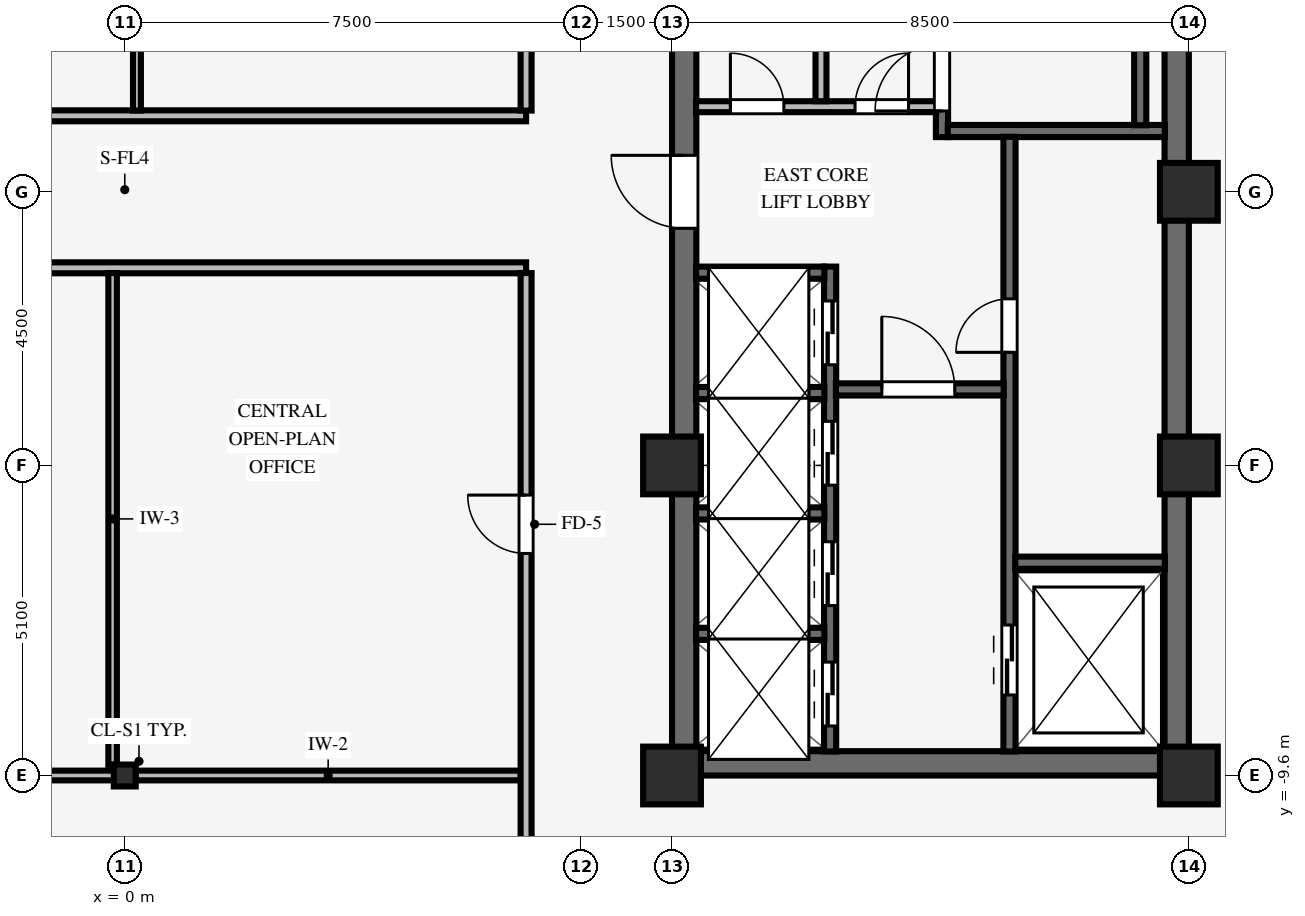
"""IFC4 building model, lengths in metres.
Left out: names, types, materials, properties, quantities, classifications, styles, units other than length and angle.
Written with IfcOpenShell. Run it as: python <this file> out.ifc"""

import sys

from ifc_helpers import new_model, si_unit, direction, frame, frame_2d, origin, origin_2d, place, context, subcontext, project, spatial, rectangle, i_section, extrude, source, transform, mapped, element, fill, save


model = new_model("IFC4")
c1 = context("Model", 3, precision=1e-05, world=origin(), true_north=direction((0.0, 1.0)))
c2 = subcontext(c1, "Body", "Model", "MODEL_VIEW")
j1 = project(units=[si_unit("LENGTHUNIT", "METRE"), si_unit("PLANEANGLEUNIT", "RADIAN")], contexts=[c1])
p1 = place(None, origin())
s1 = spatial("IfcSite", under=j1, at=p1, CompositionType="ELEMENT")
p2 = place(p1, origin())
s2 = spatial("IfcBuilding", under=s1, at=p2, CompositionType="ELEMENT")
p3 = place(p2, frame((0.0, 0.0, 142.1)))
s3 = spatial("IfcBuildingStorey", under=s2, at=p3, CompositionType="ELEMENT", Elevation=142.1)
p4 = place(p3, frame((9.0, -9.4, 0.0), z_axis=(0.0, 0.0, 1.0), x_axis=(1.0, 0.0, 0.0)))
e1 = element("IfcWall", 1, at=p4, inside=s3, PredefinedType="SHEAR", context=c2, shape_type="SweptSolid", body=[
    extrude(rectangle(XDim=8.5, YDim=0.4, at=frame_2d((4.25, 0.0))), origin(), (0.0, 0.0, 1.0), 3.37),
])
p5 = place(p3, frame((9.2, -9.205, 0.0), z_axis=(0.0, 0.0, 1.0), x_axis=(0.0, 1.0, 0.0)))
e2 = element("IfcWall", 2, at=p5, inside=s3, PredefinedType="SHEAR", context=c2, shape_type="SweptSolid", body=[
    extrude(rectangle(XDim=18.41, YDim=0.4, at=frame_2d((9.205, 0.0))), origin(), (0.0, 0.0, 1.0), 3.37),
])
p6 = place(p5, frame((8.605, 0.0, 0.0)))
e3 = element("IfcOpeningElement", 3, at=p6, cuts=e2, PredefinedType="OPENING", context=c2, shape_type="SweptSolid", body=[
    extrude(rectangle(XDim=1.2, YDim=2.15, at=frame_2d((0.6, 1.075))), frame((0.0, 0.21, 0.0), z_axis=(0.0, -1.0, 0.0), x_axis=(1.0, 0.0, 0.0)), (0.0, 0.0, 1.0), 0.42),
])
p7 = place(p3, frame((17.3, -9.205, 0.0), z_axis=(0.0, 0.0, 1.0), x_axis=(0.0, 1.0, 0.0)))
e4 = element("IfcWall", 4, at=p7, inside=s3, PredefinedType="SHEAR", context=c2, shape_type="SweptSolid", body=[
    extrude(rectangle(XDim=18.41, YDim=0.4, at=frame_2d((9.205, 0.0))), origin(), (0.0, 0.0, 1.0), 3.37),
])
for number, where, z_axis, x_axis in (
    (5, (9.0, -9.6, 0.0), (0.0, 0.0, 1.0), (1.0, 0.0, 0.0)),
    (6, (9.0, -4.5, 0.0), (0.0, 0.0, 1.0), (1.0, 0.0, 0.0)),
    (7, (17.5, -9.6, 0.0), (0.0, 0.0, 1.0), (1.0, 0.0, 0.0)),
    (8, (17.5, -4.5, 0.0), (0.0, 0.0, 1.0), (1.0, 0.0, 0.0)),
    (9, (17.5, 0.0, 0.0), (0.0, 0.0, 1.0), (1.0, 0.0, 0.0)),
):
    element("IfcColumn", number, at=place(p3, frame(where, z_axis=z_axis, x_axis=x_axis)), inside=s3, PredefinedType="COLUMN", context=c2, shape_type="SweptSolid", body=[
        extrude(rectangle(XDim=0.95, YDim=0.95, at=origin_2d()), origin(), (0.0, 0.0, 1.0), 3.37),
    ])
p8 = place(p3, frame((0.0, -9.6, 0.0), z_axis=(0.0, 0.0, 1.0), x_axis=(1.0, 0.0, 0.0)))
e10 = element("IfcColumn", 10, at=p8, inside=s3, PredefinedType="COLUMN", context=c2, shape_type="SweptSolid", body=[
    extrude(i_section(OverallWidth=0.36, OverallDepth=0.36, WebThickness=0.021, FlangeThickness=0.021, FilletRadius=0.018, at=origin_2d()), origin(), (0.0, 0.0, 1.0), 3.37),
])
p9 = place(p3, frame((13.44, 0.9, 0.0), z_axis=(0.0, 0.0, 1.0), x_axis=(0.0, 1.0, 0.0)))
e11 = element("IfcWall", 11, at=p9, inside=s3, PredefinedType="SHEAR", context=c2, shape_type="SweptSolid", body=[
    extrude(rectangle(XDim=8.305, YDim=0.2, at=frame_2d((4.153, 0.0))), origin(), (0.0, 0.0, 1.0), 3.37),
])
p10 = place(p9, frame((0.43, 0.0, 0.0)))
e12 = element("IfcOpeningElement", 12, at=p10, cuts=e11, PredefinedType="OPENING", context=c2, shape_type="SweptSolid", body=[
    extrude(rectangle(XDim=1.1, YDim=2.15, at=frame_2d((0.55, 1.075))), frame((0.0, 0.11, 0.0), z_axis=(0.0, -1.0, 0.0), x_axis=(1.0, 0.0, 0.0)), (0.0, 0.0, 1.0), 0.22),
])
p11 = place(p3, frame((13.535, 1.0, 0.0), z_axis=(0.0, 0.0, 1.0), x_axis=(1.0, 0.0, 0.0)))
e13 = element("IfcWall", 13, at=p11, inside=s3, PredefinedType="SHEAR", context=c2, shape_type="SweptSolid", body=[
    extrude(rectangle(XDim=3.57, YDim=0.2, at=frame_2d((1.785, 0.0))), origin(), (0.0, 0.0, 1.0), 3.37),
])
p12 = place(p3, frame((16.7, 1.095, 0.0), z_axis=(0.0, 0.0, 1.0), x_axis=(0.0, 1.0, 0.0)))
e14 = element("IfcWall", 14, at=p12, inside=s3, PredefinedType="SHEAR", context=c2, shape_type="SweptSolid", body=[
    extrude(rectangle(XDim=8.11, YDim=0.2, at=frame_2d((4.055, 0.0))), origin(), (0.0, 0.0, 1.0), 3.37),
])
p13 = place(p3, frame((14.55, -9.205, 0.0), z_axis=(0.0, 0.0, 1.0), x_axis=(0.0, 1.0, 0.0)))
e15 = element("IfcWall", 15, at=p13, inside=s3, PredefinedType="SHEAR", context=c2, shape_type="SweptSolid", body=[
    extrude(rectangle(XDim=10.11, YDim=0.2, at=frame_2d((5.055, 0.0))), origin(), (0.0, 0.0, 1.0), 3.37),
])
p14 = place(p13, frame((6.565, 0.0, 0.0)))
e16 = element("IfcOpeningElement", 16, at=p14, cuts=e15, PredefinedType="OPENING", context=c2, shape_type="SweptSolid", body=[
    extrude(rectangle(XDim=0.88, YDim=2.1, at=frame_2d((0.44, 1.05))), frame((0.0, 0.11, 0.0), z_axis=(0.0, -1.0, 0.0), x_axis=(1.0, 0.0, 0.0)), (0.0, 0.0, 1.0), 0.22),
])
p15 = place(p13, frame((0.93, 0.0, 0.0)))
e17 = element("IfcOpeningElement", 17, at=p15, cuts=e15, PredefinedType="OPENING", context=c2, shape_type="SweptSolid", body=[
    extrude(rectangle(XDim=1.15, YDim=2.15, at=frame_2d((0.575, 1.075))), frame((0.0, 0.11, 0.0), z_axis=(0.0, -1.0, 0.0), x_axis=(1.0, 0.0, 0.0)), (0.0, 0.0, 1.0), 0.22),
])
p16 = place(p3, frame((14.645, -6.1, 0.0), z_axis=(0.0, 0.0, 1.0), x_axis=(1.0, 0.0, 0.0)))
e18 = element("IfcWall", 18, at=p16, inside=s3, PredefinedType="SHEAR", context=c2, shape_type="SweptSolid", body=[
    extrude(rectangle(XDim=2.46, YDim=0.2, at=frame_2d((1.23, 0.0))), origin(), (0.0, 0.0, 1.0), 3.37),
])
p17 = place(p3, frame((11.6, -9.205, 0.0), z_axis=(0.0, 0.0, 1.0), x_axis=(0.0, 1.0, 0.0)))
e19 = element("IfcWall", 19, at=p17, inside=s3, PredefinedType="SHEAR", context=c2, shape_type="SweptSolid", body=[
    extrude(rectangle(XDim=7.975, YDim=0.2, at=frame_2d((3.988, 0.0))), origin(), (0.0, 0.0, 1.0), 3.37),
])
p18 = place(p17, frame((0.42, 0.0, 0.0)))
e20 = element("IfcOpeningElement", 20, at=p18, cuts=e19, PredefinedType="OPENING", context=c2, shape_type="SweptSolid", body=[
    extrude(rectangle(XDim=1.05, YDim=2.15, at=frame_2d((0.525, 1.075))), frame((0.0, 0.11, 0.0), z_axis=(0.0, -1.0, 0.0), x_axis=(1.0, 0.0, 0.0)), (0.0, 0.0, 1.0), 0.22),
])
p19 = place(p17, frame((2.4, 0.0, 0.0)))
e21 = element("IfcOpeningElement", 21, at=p19, cuts=e19, PredefinedType="OPENING", context=c2, shape_type="SweptSolid", body=[
    extrude(rectangle(XDim=1.05, YDim=2.15, at=frame_2d((0.525, 1.075))), frame((0.0, 0.11, 0.0), z_axis=(0.0, -1.0, 0.0), x_axis=(1.0, 0.0, 0.0)), (0.0, 0.0, 1.0), 0.22),
])
p20 = place(p17, frame((4.38, 0.0, 0.0)))
e22 = element("IfcOpeningElement", 22, at=p20, cuts=e19, PredefinedType="OPENING", context=c2, shape_type="SweptSolid", body=[
    extrude(rectangle(XDim=1.05, YDim=2.15, at=frame_2d((0.525, 1.075))), frame((0.0, 0.11, 0.0), z_axis=(0.0, -1.0, 0.0), x_axis=(1.0, 0.0, 0.0)), (0.0, 0.0, 1.0), 0.22),
])
p21 = place(p17, frame((6.36, 0.0, 0.0)))
e23 = element("IfcOpeningElement", 23, at=p21, cuts=e19, PredefinedType="OPENING", context=c2, shape_type="SweptSolid", body=[
    extrude(rectangle(XDim=1.05, YDim=2.15, at=frame_2d((0.525, 1.075))), frame((0.0, 0.11, 0.0), z_axis=(0.0, -1.0, 0.0), x_axis=(1.0, 0.0, 0.0)), (0.0, 0.0, 1.0), 0.22),
])
p22 = place(p3, frame((11.695, -3.25, 0.0), z_axis=(0.0, 0.0, 1.0), x_axis=(1.0, 0.0, 0.0)))
e24 = element("IfcWall", 24, at=p22, inside=s3, PredefinedType="SHEAR", context=c2, shape_type="SweptSolid", body=[
    extrude(rectangle(XDim=2.76, YDim=0.2, at=frame_2d((1.38, 0.0))), origin(), (0.0, 0.0, 1.0), 3.37),
])
p23 = place(p22, frame((0.755, 0.0, 0.0)))
e25 = element("IfcOpeningElement", 25, at=p23, cuts=e24, PredefinedType="OPENING", context=c2, shape_type="SweptSolid", body=[
    extrude(rectangle(XDim=1.2, YDim=2.15, at=frame_2d((0.6, 1.075))), frame((0.0, 0.11, 0.0), z_axis=(0.0, -1.0, 0.0), x_axis=(1.0, 0.0, 0.0)), (0.0, 0.0, 1.0), 0.22),
])
for number, where, z_axis, x_axis in (
    (26, (9.395, -7.27, 0.0), (0.0, 0.0, 1.0), (1.0, 0.0, 0.0)),
    (27, (9.395, -5.29, 0.0), (0.0, 0.0, 1.0), (1.0, 0.0, 0.0)),
    (28, (9.395, -3.31, 0.0), (0.0, 0.0, 1.0), (1.0, 0.0, 0.0)),
    (29, (9.395, -1.33, 0.0), (0.0, 0.0, 1.0), (1.0, 0.0, 0.0)),
):
    element("IfcWall", number, at=place(p3, frame(where, z_axis=z_axis, x_axis=x_axis)), inside=s3, PredefinedType="SHEAR", context=c2, shape_type="SweptSolid", body=[
        extrude(rectangle(XDim=2.11, YDim=0.2, at=frame_2d((1.055, 0.0))), origin(), (0.0, 0.0, 1.0), 3.37),
    ])
p24 = place(p3, frame((9.395, 1.4, 0.0), z_axis=(0.0, 0.0, 1.0), x_axis=(1.0, 0.0, 0.0)))
e30 = element("IfcWall", 30, at=p24, inside=s3, PredefinedType="PARTITIONING", context=c2, shape_type="SweptSolid", body=[
    extrude(rectangle(XDim=3.95, YDim=0.18, at=frame_2d((1.975, 0.0))), origin(), (0.0, 0.0, 1.0), 3.36),
])
p25 = place(p24, frame((0.565, 0.0, 0.0)))
e31 = element("IfcOpeningElement", 31, at=p25, cuts=e30, PredefinedType="OPENING", context=c2, shape_type="SweptSolid", body=[
    extrude(rectangle(XDim=0.88, YDim=2.1, at=frame_2d((0.44, 1.05))), frame((0.0, 0.1, 0.0), z_axis=(0.0, -1.0, 0.0), x_axis=(1.0, 0.0, 0.0)), (0.0, 0.0, 1.0), 0.2),
])
p26 = place(p24, frame((2.615, 0.0, 0.0)))
e32 = element("IfcOpeningElement", 32, at=p26, cuts=e30, PredefinedType="OPENING", context=c2, shape_type="SweptSolid", body=[
    extrude(rectangle(XDim=0.88, YDim=2.1, at=frame_2d((0.44, 1.05))), frame((0.0, 0.1, 0.0), z_axis=(0.0, -1.0, 0.0), x_axis=(1.0, 0.0, 0.0)), (0.0, 0.0, 1.0), 0.2),
])
p27 = place(p3, frame((11.45, 1.49, 0.0), z_axis=(0.0, 0.0, 1.0), x_axis=(0.0, 1.0, 0.0)))
e33 = element("IfcWall", 33, at=p27, inside=s3, PredefinedType="PARTITIONING", context=c2, shape_type="SweptSolid", body=[
    extrude(rectangle(XDim=7.715, YDim=0.18, at=frame_2d((3.857, 0.0))), origin(), (0.0, 0.0, 1.0), 3.36),
])
p28 = place(p3, frame((-8.529, -9.6, 0.0), z_axis=(0.0, 0.0, 1.0), x_axis=(1.0, 0.0, 0.0)))
e34 = element("IfcWall", 34, at=p28, inside=s3, PredefinedType="PARTITIONING", context=c2, shape_type="SweptSolid", body=[
    extrude(rectangle(XDim=8.353, YDim=0.16, at=frame_2d((4.177, 0.0))), origin(), (0.0, 0.0, 1.0), 2.405),
])
p29 = place(p3, frame((0.176, -9.6, 0.0), z_axis=(0.0, 0.0, 1.0), x_axis=(1.0, 0.0, 0.0)))
e35 = element("IfcWall", 35, at=p29, inside=s3, PredefinedType="PARTITIONING", context=c2, shape_type="SweptSolid", body=[
    extrude(rectangle(XDim=6.338, YDim=0.16, at=frame_2d((3.169, 0.0))), origin(), (0.0, 0.0, 1.0), 2.405),
])
p30 = place(p3, frame((-9.0, -1.25, 0.0), z_axis=(0.0, 0.0, 1.0), x_axis=(1.0, 0.0, 0.0)))
e36 = element("IfcWall", 36, at=p30, inside=s3, PredefinedType="PARTITIONING", context=c2, shape_type="SweptSolid", body=[
    extrude(rectangle(XDim=15.6, YDim=0.18, at=frame_2d((7.8, 0.0))), origin(), (0.0, 0.0, 1.0), 3.36),
])
p31 = place(p30, frame((3.92, 0.0, 0.0)))
e37 = element("IfcOpeningElement", 37, at=p31, cuts=e36, PredefinedType="OPENING", context=c2, shape_type="SweptSolid", body=[
    extrude(rectangle(XDim=0.96, YDim=2.1, at=frame_2d((0.48, 1.05))), frame((0.0, 0.1, 0.0), z_axis=(0.0, -1.0, 0.0), x_axis=(1.0, 0.0, 0.0)), (0.0, 0.0, 1.0), 0.2),
])
p32 = place(p3, frame((-9.0, 1.25, 0.0), z_axis=(0.0, 0.0, 1.0), x_axis=(1.0, 0.0, 0.0)))
e38 = element("IfcWall", 38, at=p32, inside=s3, PredefinedType="PARTITIONING", context=c2, shape_type="SweptSolid", body=[
    extrude(rectangle(XDim=15.6, YDim=0.18, at=frame_2d((7.8, 0.0))), origin(), (0.0, 0.0, 1.0), 3.36),
])
p33 = place(p32, frame((4.12, 0.0, 0.0)))
e39 = element("IfcOpeningElement", 39, at=p33, cuts=e38, PredefinedType="OPENING", context=c2, shape_type="SweptSolid", body=[
    extrude(rectangle(XDim=0.96, YDim=2.1, at=frame_2d((0.48, 1.05))), frame((0.0, 0.1, 0.0), z_axis=(0.0, -1.0, 0.0), x_axis=(1.0, 0.0, 0.0)), (0.0, 0.0, 1.0), 0.2),
])
p34 = place(p3, frame((-0.2, -9.424, 0.0), z_axis=(0.0, 0.0, 1.0), x_axis=(0.0, 1.0, 0.0)))
e40 = element("IfcWall", 40, at=p34, inside=s3, PredefinedType="PARTITIONING", context=c2, shape_type="SweptSolid", body=[
    extrude(rectangle(XDim=8.088, YDim=0.14, at=frame_2d((4.044, 0.0))), origin(), (0.0, 0.0, 1.0), 2.816),
])
p35 = place(p3, frame((0.2, 1.336, 0.0), z_axis=(0.0, 0.0, 1.0), x_axis=(0.0, 1.0, 0.0)))
e41 = element("IfcWall", 41, at=p35, inside=s3, PredefinedType="PARTITIONING", context=c2, shape_type="SweptSolid", body=[
    extrude(rectangle(XDim=8.088, YDim=0.13, at=frame_2d((4.044, 0.0))), origin(), (0.0, 0.0, 1.0), 2.816),
])
p36 = place(p3, frame((6.6, -13.414, 0.0), z_axis=(0.0, 0.0, 1.0), x_axis=(0.0, 1.0, 0.0)))
e42 = element("IfcWall", 42, at=p36, inside=s3, PredefinedType="PARTITIONING", context=c2, shape_type="SweptSolid", body=[
    extrude(rectangle(XDim=12.078, YDim=0.18, at=frame_2d((6.039, 0.0))), origin(), (0.0, 0.0, 1.0), 3.36),
])
p37 = place(p36, frame((7.466, 0.0, 0.0)))
e43 = element("IfcOpeningElement", 43, at=p37, cuts=e42, PredefinedType="OPENING", context=c2, shape_type="SweptSolid", body=[
    extrude(rectangle(XDim=0.96, YDim=2.1, at=frame_2d((0.48, 1.05))), frame((0.0, 0.1, 0.0), z_axis=(0.0, -1.0, 0.0), x_axis=(1.0, 0.0, 0.0)), (0.0, 0.0, 1.0), 0.2),
])
p38 = place(p3, frame((6.6, 1.336, 0.0), z_axis=(0.0, 0.0, 1.0), x_axis=(0.0, 1.0, 0.0)))
e44 = element("IfcWall", 44, at=p38, inside=s3, PredefinedType="PARTITIONING", context=c2, shape_type="SweptSolid", body=[
    extrude(rectangle(XDim=12.078, YDim=0.18, at=frame_2d((6.039, 0.0))), origin(), (0.0, 0.0, 1.0), 3.36),
])
p39 = place(p38, frame((3.652, 0.0, 0.0)))
e45 = element("IfcOpeningElement", 45, at=p39, cuts=e44, PredefinedType="OPENING", context=c2, shape_type="SweptSolid", body=[
    extrude(rectangle(XDim=0.96, YDim=2.1, at=frame_2d((0.48, 1.05))), frame((0.0, 0.1, 0.0), z_axis=(0.0, -1.0, 0.0), x_axis=(1.0, 0.0, 0.0)), (0.0, 0.0, 1.0), 0.2),
])
p40 = place(p38, frame((9.721, 0.0, 0.0)))
e46 = element("IfcOpeningElement", 46, at=p40, cuts=e44, PredefinedType="OPENING", context=c2, shape_type="SweptSolid", body=[
    extrude(rectangle(XDim=0.9, YDim=2.1, at=frame_2d((0.45, 1.05))), frame((0.0, 0.1, 0.0), z_axis=(0.0, -1.0, 0.0), x_axis=(1.0, 0.0, 0.0)), (0.0, 0.0, 1.0), 0.2),
])
m1 = source(origin(), c2, "Body", "SweptSolid", [
    extrude(rectangle(XDim=1.1, YDim=2.15, at=frame_2d((0.55, 1.075))), frame((0.0, 0.025, 0.0), z_axis=(0.0, -1.0, 0.0), x_axis=(1.0, 0.0, 0.0)), (0.0, 0.0, 1.0), 0.05),
])
p41 = place(p10, origin())
e47 = element("IfcDoor", 47, at=p41, inside=s3, OperationType="SINGLE_SWING_LEFT", PredefinedType="DOOR", context=c2, shape_type="MappedRepresentation", body=[
    mapped(m1, transform((0.0, 0.0, 0.0), scale=1.0)),
])
fill(e12, e47)
m2 = source(origin(), c2, "Body", "SweptSolid", [
    extrude(rectangle(XDim=0.88, YDim=2.1, at=frame_2d((0.44, 1.05))), frame((0.0, 0.025, 0.0), z_axis=(0.0, -1.0, 0.0), x_axis=(1.0, 0.0, 0.0)), (0.0, 0.0, 1.0), 0.05),
])
p42 = place(p14, origin())
e48 = element("IfcDoor", 48, at=p42, inside=s3, OperationType="SINGLE_SWING_LEFT", PredefinedType="DOOR", context=c2, shape_type="MappedRepresentation", body=[
    mapped(m2, transform((0.0, 0.0, 0.0), scale=1.0)),
])
fill(e16, e48)
m3 = source(origin(), c2, "Body", "SweptSolid", [
    extrude(rectangle(XDim=1.2, YDim=2.15, at=frame_2d((0.6, 1.075))), frame((0.0, 0.025, 0.0), z_axis=(0.0, -1.0, 0.0), x_axis=(1.0, 0.0, 0.0)), (0.0, 0.0, 1.0), 0.05),
])
p43 = place(p23, origin())
e49 = element("IfcDoor", 49, at=p43, inside=s3, OperationType="SINGLE_SWING_LEFT", PredefinedType="DOOR", context=c2, shape_type="MappedRepresentation", body=[
    mapped(m3, transform((0.0, 0.0, 0.0), scale=1.0)),
])
fill(e25, e49)
p44 = place(p6, origin())
e50 = element("IfcDoor", 50, at=p44, inside=s3, OperationType="SINGLE_SWING_RIGHT", PredefinedType="DOOR", context=c2, shape_type="MappedRepresentation", body=[
    mapped(m3, transform((0.0, 0.0, 0.0), scale=1.0)),
])
fill(e3, e50)
p45 = place(p25, origin())
e51 = element("IfcDoor", 51, at=p45, inside=s3, OperationType="SINGLE_SWING_LEFT", PredefinedType="DOOR", context=c2, shape_type="MappedRepresentation", body=[
    mapped(m2, transform((0.0, 0.0, 0.0), scale=1.0)),
])
fill(e31, e51)
p46 = place(p26, origin())
e52 = element("IfcDoor", 52, at=p46, inside=s3, OperationType="SINGLE_SWING_RIGHT", PredefinedType="DOOR", context=c2, shape_type="MappedRepresentation", body=[
    mapped(m2, transform((0.0, 0.0, 0.0), scale=1.0)),
])
fill(e32, e52)
m4 = source(origin(), c2, "Body", "SweptSolid", [
    extrude(rectangle(XDim=1.15, YDim=2.15, at=frame_2d((0.575, 1.075))), frame((0.0, 0.025, 0.0), z_axis=(0.0, -1.0, 0.0), x_axis=(1.0, 0.0, 0.0)), (0.0, 0.0, 1.0), 0.05),
])
p47 = place(p15, origin())
e53 = element("IfcDoor", 53, at=p47, inside=s3, OperationType="DOUBLE_DOOR_SLIDING", PredefinedType="DOOR", context=c2, shape_type="MappedRepresentation", body=[
    mapped(m4, transform((0.0, 0.0, 0.0), scale=1.0)),
])
fill(e17, e53)
m5 = source(origin(), c2, "Body", "SweptSolid", [
    extrude(rectangle(XDim=1.05, YDim=2.15, at=frame_2d((0.525, 1.075))), frame((0.0, 0.025, 0.0), z_axis=(0.0, -1.0, 0.0), x_axis=(1.0, 0.0, 0.0)), (0.0, 0.0, 1.0), 0.05),
])
p48 = place(p18, origin())
e54 = element("IfcDoor", 54, at=p48, inside=s3, OperationType="DOUBLE_DOOR_SLIDING", PredefinedType="DOOR", context=c2, shape_type="MappedRepresentation", body=[
    mapped(m5, transform((0.0, 0.0, 0.0), scale=1.0)),
])
fill(e20, e54)
p49 = place(p19, origin())
e55 = element("IfcDoor", 55, at=p49, inside=s3, OperationType="DOUBLE_DOOR_SLIDING", PredefinedType="DOOR", context=c2, shape_type="MappedRepresentation", body=[
    mapped(m5, transform((0.0, 0.0, 0.0), scale=1.0)),
])
fill(e21, e55)
p50 = place(p20, origin())
e56 = element("IfcDoor", 56, at=p50, inside=s3, OperationType="DOUBLE_DOOR_SLIDING", PredefinedType="DOOR", context=c2, shape_type="MappedRepresentation", body=[
    mapped(m5, transform((0.0, 0.0, 0.0), scale=1.0)),
])
fill(e22, e56)
p51 = place(p21, origin())
e57 = element("IfcDoor", 57, at=p51, inside=s3, OperationType="DOUBLE_DOOR_SLIDING", PredefinedType="DOOR", context=c2, shape_type="MappedRepresentation", body=[
    mapped(m5, transform((0.0, 0.0, 0.0), scale=1.0)),
])
fill(e23, e57)
m6 = source(origin(), c2, "Body", "SweptSolid", [
    extrude(rectangle(XDim=0.96, YDim=2.1, at=frame_2d((0.48, 1.05))), frame((0.0, 0.025, 0.0), z_axis=(0.0, -1.0, 0.0), x_axis=(1.0, 0.0, 0.0)), (0.0, 0.0, 1.0), 0.05),
])
p52 = place(p37, origin())
e58 = element("IfcDoor", 58, at=p52, inside=s3, OperationType="SINGLE_SWING_RIGHT", PredefinedType="DOOR", context=c2, shape_type="MappedRepresentation", body=[
    mapped(m6, transform((0.0, 0.0, 0.0), scale=1.0)),
])
fill(e43, e58)
save(model, sys.argv[1])
